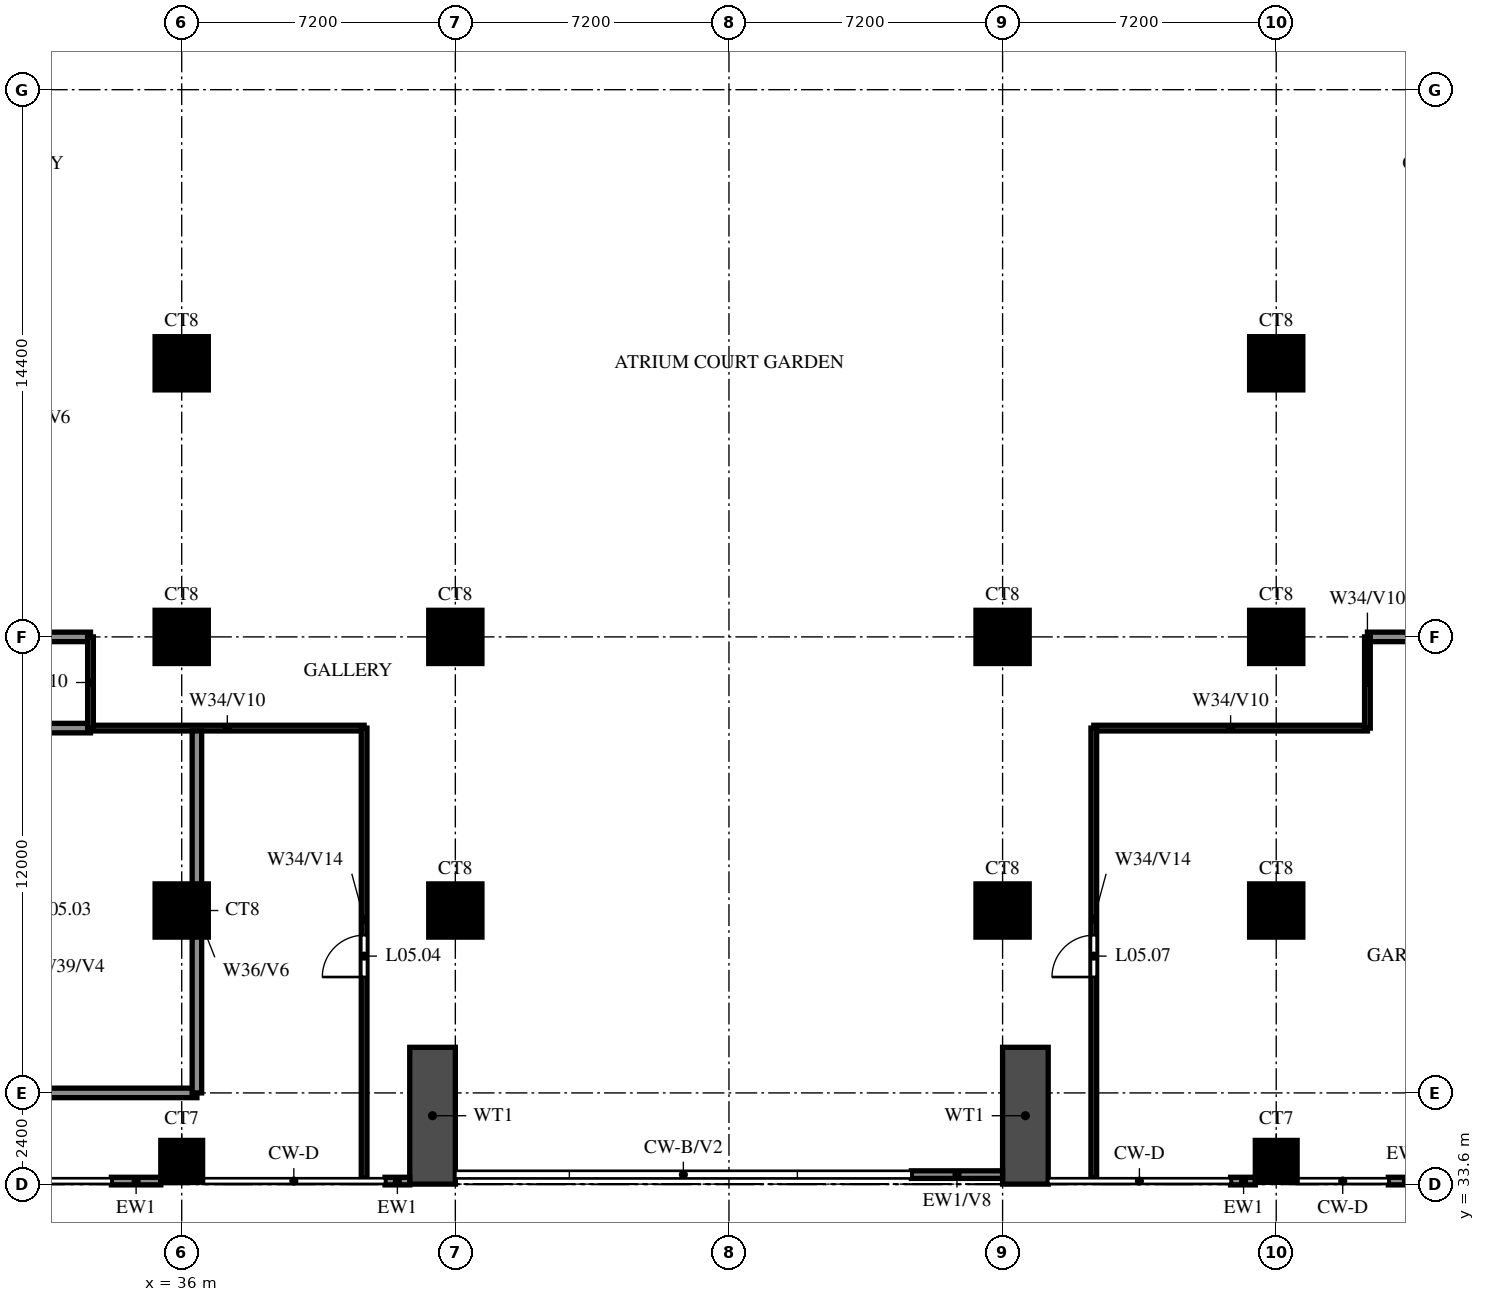
"""IFC4 building model, lengths in metres.
Left out: names, types, materials, properties, quantities, classifications, styles, units other than length and angle.
Written with IfcOpenShell. Run it as: python <this file> out.ifc"""

import sys

from ifc_helpers import new_model, si_unit, direction, frame, frame_2d, origin, origin_2d, place, context, subcontext, project, spatial, rectangle, extrude, source, transform, mapped, element, fill, save


model = new_model("IFC4")
c1 = context("Model", 3, precision=1e-05, world=origin(), true_north=direction((0.0, 1.0)))
c2 = subcontext(c1, "Body", "Model", "MODEL_VIEW")
j1 = project(units=[si_unit("LENGTHUNIT", "METRE"), si_unit("PLANEANGLEUNIT", "RADIAN")], contexts=[c1])
p1 = place(None, origin())
s1 = spatial("IfcSite", under=j1, at=p1, CompositionType="ELEMENT")
p2 = place(p1, origin())
s2 = spatial("IfcBuilding", under=s1, at=p2, CompositionType="ELEMENT")
p3 = place(p2, frame((0.0, 0.0, 27.0)))
s3 = spatial("IfcBuildingStorey", under=s2, at=p3, CompositionType="ELEMENT", Elevation=27.0)
m1 = source(origin(), c2, "Body", "SweptSolid", [
    extrude(rectangle(XDim=1.1, YDim=1.1, at=origin_2d()), origin(), (0.0, 0.0, 1.0), 3.18),
])
for number, where, z_axis, x_axis in (
    (1, (36.0, 34.2, 0.0), (0.0, 0.0, 1.0), (1.0, 0.0, 0.0)),
    (2, (64.8, 34.2, 0.0), (0.0, 0.0, 1.0), (1.0, 0.0, 0.0)),
):
    element("IfcColumn", number, at=place(p3, frame(where, z_axis=z_axis, x_axis=x_axis)), inside=s3, PredefinedType="COLUMN", context=c2, shape_type="MappedRepresentation", body=[
        mapped(m1, transform((0.0, 0.0, 0.0))),
    ])
m2 = source(origin(), c2, "Body", "SweptSolid", [
    extrude(rectangle(XDim=1.4, YDim=1.4, at=origin_2d()), origin(), (0.0, 0.0, 1.0), 3.18),
])
for number, where, z_axis, x_axis in (
    (3, (36.0, 40.8, 0.0), (0.0, 0.0, 1.0), (1.0, 0.0, 0.0)),
    (4, (43.2, 40.8, 0.0), (0.0, 0.0, 1.0), (1.0, 0.0, 0.0)),
    (5, (57.6, 40.8, 0.0), (0.0, 0.0, 1.0), (1.0, 0.0, 0.0)),
    (6, (64.8, 40.8, 0.0), (0.0, 0.0, 1.0), (1.0, 0.0, 0.0)),
    (7, (36.0, 48.0, 0.0), (0.0, 0.0, 1.0), (1.0, 0.0, 0.0)),
    (8, (43.2, 48.0, 0.0), (0.0, 0.0, 1.0), (1.0, 0.0, 0.0)),
    (9, (57.6, 48.0, 0.0), (0.0, 0.0, 1.0), (1.0, 0.0, 0.0)),
    (10, (64.8, 48.0, 0.0), (0.0, 0.0, 1.0), (1.0, 0.0, 0.0)),
    (11, (36.0, 55.2, 0.0), (0.0, 0.0, 1.0), (1.0, 0.0, 0.0)),
    (12, (64.8, 55.2, 0.0), (0.0, 0.0, 1.0), (1.0, 0.0, 0.0)),
):
    element("IfcColumn", number, at=place(p3, frame(where, z_axis=z_axis, x_axis=x_axis)), inside=s3, PredefinedType="COLUMN", context=c2, shape_type="MappedRepresentation", body=[
        mapped(m2, transform((0.0, 0.0, 0.0))),
    ])
for number, where, z_axis, x_axis in (
    (13, (42.6, 33.6, 0.0), (0.0, 0.0, 1.0), (0.0, 1.0, 0.0)),
    (14, (58.2, 33.6, 0.0), (0.0, 0.0, 1.0), (0.0, 1.0, 0.0)),
):
    element("IfcWall", number, at=place(p3, frame(where, z_axis=z_axis, x_axis=x_axis)), inside=s3, PredefinedType="SHEAR", context=c2, shape_type="SweptSolid", body=[
        extrude(rectangle(XDim=3.6, YDim=1.2, at=frame_2d((1.8, 0.0))), origin(), (0.0, 0.0, 1.0), 3.18),
    ])
p4 = place(p3, frame((34.15, 33.68, 0.0), z_axis=(0.0, 0.0, 1.0), x_axis=(1.0, 0.0, 0.0)))
e15 = element("IfcWall", 15, at=p4, inside=s3, PredefinedType="SOLIDWALL", context=c2, shape_type="SweptSolid", body=[
    extrude(rectangle(XDim=1.3, YDim=0.2, at=frame_2d((0.65, 0.0))), origin(), (0.0, 0.0, 1.0), 3.18),
])
for number, where, z_axis, x_axis in (
    (16, (41.35, 33.68, 0.0), (0.0, 0.0, 1.0), (1.0, 0.0, 0.0)),
    (17, (63.6, 33.68, 0.0), (0.0, 0.0, 1.0), (1.0, 0.0, 0.0)),
):
    element("IfcWall", number, at=place(p3, frame(where, z_axis=z_axis, x_axis=x_axis)), inside=s3, PredefinedType="SOLIDWALL", context=c2, shape_type="SweptSolid", body=[
        extrude(rectangle(XDim=0.65, YDim=0.2, at=frame_2d((0.325, 0.0))), origin(), (0.0, 0.0, 1.0), 3.18),
    ])
p5 = place(p3, frame((67.75, 33.68, 0.0), z_axis=(0.0, 0.0, 1.0), x_axis=(1.0, 0.0, 0.0)))
e18 = element("IfcWall", 18, at=p5, inside=s3, PredefinedType="SOLIDWALL", context=c2, shape_type="SweptSolid", body=[
    extrude(rectangle(XDim=0.95, YDim=0.2, at=frame_2d((0.475, 0.0))), origin(), (0.0, 0.0, 1.0), 3.18),
])
p6 = place(p3, frame((55.2, 33.85, 0.0), z_axis=(0.0, 0.0, 1.0), x_axis=(1.0, 0.0, 0.0)))
e19 = element("IfcWall", 19, at=p6, inside=s3, PredefinedType="SOLIDWALL", context=c2, shape_type="SweptSolid", body=[
    extrude(rectangle(XDim=2.4, YDim=0.2, at=frame_2d((1.2, 0.0))), origin(), (0.0, 0.0, 1.0), 1.98),
])
p7 = place(p3, frame((22.0, 36.0, 0.0), z_axis=(0.0, 0.0, 1.0), x_axis=(1.0, 0.0, 0.0)))
e20 = element("IfcWall", 20, at=p7, inside=s3, PredefinedType="SOLIDWALL", context=c2, shape_type="SweptSolid", body=[
    extrude(rectangle(XDim=14.4, YDim=0.25, at=frame_2d((7.2, 0.0))), origin(), (0.0, 0.0, 1.0), 3.18),
])
for number, where, z_axis, x_axis in (
    (21, (33.6, 45.6, 0.0), (0.0, 0.0, 1.0), (1.0, 0.0, 0.0)),
    (22, (60.0, 45.6, 0.0), (0.0, 0.0, 1.0), (1.0, 0.0, 0.0)),
):
    element("IfcWall", number, at=place(p3, frame(where, z_axis=z_axis, x_axis=x_axis)), inside=s3, PredefinedType="PARTITIONING", context=c2, shape_type="SweptSolid", body=[
        extrude(rectangle(XDim=7.2, YDim=0.15, at=frame_2d((3.6, 0.0))), origin(), (0.0, 0.0, 1.0), 3.18),
    ])
p8 = place(p3, frame((22.0, 45.6, 0.0), z_axis=(0.0, 0.0, 1.0), x_axis=(1.0, 0.0, 0.0)))
e23 = element("IfcWall", 23, at=p8, inside=s3, PredefinedType="SOLIDWALL", context=c2, shape_type="SweptSolid", body=[
    extrude(rectangle(XDim=11.6, YDim=0.25, at=frame_2d((5.8, 0.0))), origin(), (0.0, 0.0, 1.0), 3.18),
])
p9 = place(p8, frame((6.65, 0.0, 0.0)))
e24 = element("IfcOpeningElement", 24, at=p9, cuts=e23, PredefinedType="OPENING", context=c2, shape_type="SweptSolid", body=[
    extrude(rectangle(XDim=1.1, YDim=2.1, at=frame_2d((0.55, 1.05))), frame((0.0, 0.135, 0.0), z_axis=(0.0, -1.0, 0.0), x_axis=(1.0, 0.0, 0.0)), (0.0, 0.0, 1.0), 0.27),
])
p10 = place(p3, frame((14.57, 48.0, 0.0), z_axis=(0.0, 0.0, 1.0), x_axis=(1.0, 0.0, 0.0)))
e25 = element("IfcWall", 25, at=p10, inside=s3, PredefinedType="SOLIDWALL", context=c2, shape_type="SweptSolid", body=[
    extrude(rectangle(XDim=19.03, YDim=0.25, at=frame_2d((9.515, 0.0))), origin(), (0.0, 0.0, 1.0), 3.18),
])
p11 = place(p3, frame((67.2, 48.0, 0.0), z_axis=(0.0, 0.0, 1.0), x_axis=(1.0, 0.0, 0.0)))
e26 = element("IfcWall", 26, at=p11, inside=s3, PredefinedType="SOLIDWALL", context=c2, shape_type="SweptSolid", body=[
    extrude(rectangle(XDim=4.63, YDim=0.25, at=frame_2d((2.315, 0.0))), origin(), (0.0, 0.0, 1.0), 3.18),
])
p12 = place(p3, frame((33.6, 45.6, 0.0), z_axis=(0.0, 0.0, 1.0), x_axis=(0.0, 1.0, 0.0)))
e27 = element("IfcWall", 27, at=p12, inside=s3, PredefinedType="PARTITIONING", context=c2, shape_type="SweptSolid", body=[
    extrude(rectangle(XDim=2.4, YDim=0.15, at=frame_2d((1.2, 0.0))), origin(), (0.0, 0.0, 1.0), 3.18),
])
p13 = place(p3, frame((36.4, 36.0, 0.0), z_axis=(0.0, 0.0, 1.0), x_axis=(0.0, 1.0, 0.0)))
e28 = element("IfcWall", 28, at=p13, inside=s3, PredefinedType="SOLIDWALL", context=c2, shape_type="SweptSolid", body=[
    extrude(rectangle(XDim=9.525, YDim=0.25, at=frame_2d((4.762, 0.0))), origin(), (0.0, 0.0, 1.0), 3.18),
])
p14 = place(p3, frame((40.8, 33.77, 0.0), z_axis=(0.0, 0.0, 1.0), x_axis=(0.0, 1.0, 0.0)))
e29 = element("IfcWall", 29, at=p14, inside=s3, PredefinedType="PARTITIONING", context=c2, shape_type="SweptSolid", body=[
    extrude(rectangle(XDim=11.83, YDim=0.15, at=frame_2d((5.915, 0.0))), origin(), (0.0, 0.0, 1.0), 2.28),
])
p15 = place(p14, frame((5.28, 0.0, 0.0)))
e30 = element("IfcOpeningElement", 30, at=p15, cuts=e29, PredefinedType="OPENING", context=c2, shape_type="SweptSolid", body=[
    extrude(rectangle(XDim=1.1, YDim=2.1, at=frame_2d((0.55, 1.05))), frame((0.0, 0.085, 0.0), z_axis=(0.0, -1.0, 0.0), x_axis=(1.0, 0.0, 0.0)), (0.0, 0.0, 1.0), 0.17),
])
p16 = place(p3, frame((60.0, 33.77, 0.0), z_axis=(0.0, 0.0, 1.0), x_axis=(0.0, 1.0, 0.0)))
e31 = element("IfcWall", 31, at=p16, inside=s3, PredefinedType="PARTITIONING", context=c2, shape_type="SweptSolid", body=[
    extrude(rectangle(XDim=11.83, YDim=0.15, at=frame_2d((5.915, 0.0))), origin(), (0.0, 0.0, 1.0), 2.28),
])
p17 = place(p16, frame((5.28, 0.0, 0.0)))
e32 = element("IfcOpeningElement", 32, at=p17, cuts=e31, PredefinedType="OPENING", context=c2, shape_type="SweptSolid", body=[
    extrude(rectangle(XDim=1.1, YDim=2.1, at=frame_2d((0.55, 1.05))), frame((0.0, 0.085, 0.0), z_axis=(0.0, -1.0, 0.0), x_axis=(1.0, 0.0, 0.0)), (0.0, 0.0, 1.0), 0.17),
])
p18 = place(p3, frame((67.2, 45.6, 0.0), z_axis=(0.0, 0.0, 1.0), x_axis=(0.0, 1.0, 0.0)))
e33 = element("IfcWall", 33, at=p18, inside=s3, PredefinedType="PARTITIONING", context=c2, shape_type="SweptSolid", body=[
    extrude(rectangle(XDim=2.4, YDim=0.15, at=frame_2d((1.2, 0.0))), origin(), (0.0, 0.0, 1.0), 3.18),
])
p19 = place(p15, origin())
e34 = element("IfcDoor", 34, at=p19, inside=s3, OperationType="SINGLE_SWING_LEFT", PredefinedType="DOOR", context=c2, shape_type="SweptSolid", body=[
    extrude(rectangle(XDim=1.1, YDim=2.1, at=frame_2d((0.55, 1.05))), frame((0.0, 0.025, 0.0), z_axis=(0.0, -1.0, 0.0), x_axis=(1.0, 0.0, 0.0)), (0.0, 0.0, 1.0), 0.05),
])
fill(e30, e34)
p20 = place(p17, origin())
e35 = element("IfcDoor", 35, at=p20, inside=s3, OperationType="SINGLE_SWING_LEFT", PredefinedType="DOOR", context=c2, shape_type="SweptSolid", body=[
    extrude(rectangle(XDim=1.1, YDim=2.1, at=frame_2d((0.55, 1.05))), frame((0.0, 0.025, 0.0), z_axis=(0.0, -1.0, 0.0), x_axis=(1.0, 0.0, 0.0)), (0.0, 0.0, 1.0), 0.05),
])
fill(e32, e35)
save(model, sys.argv[1])
